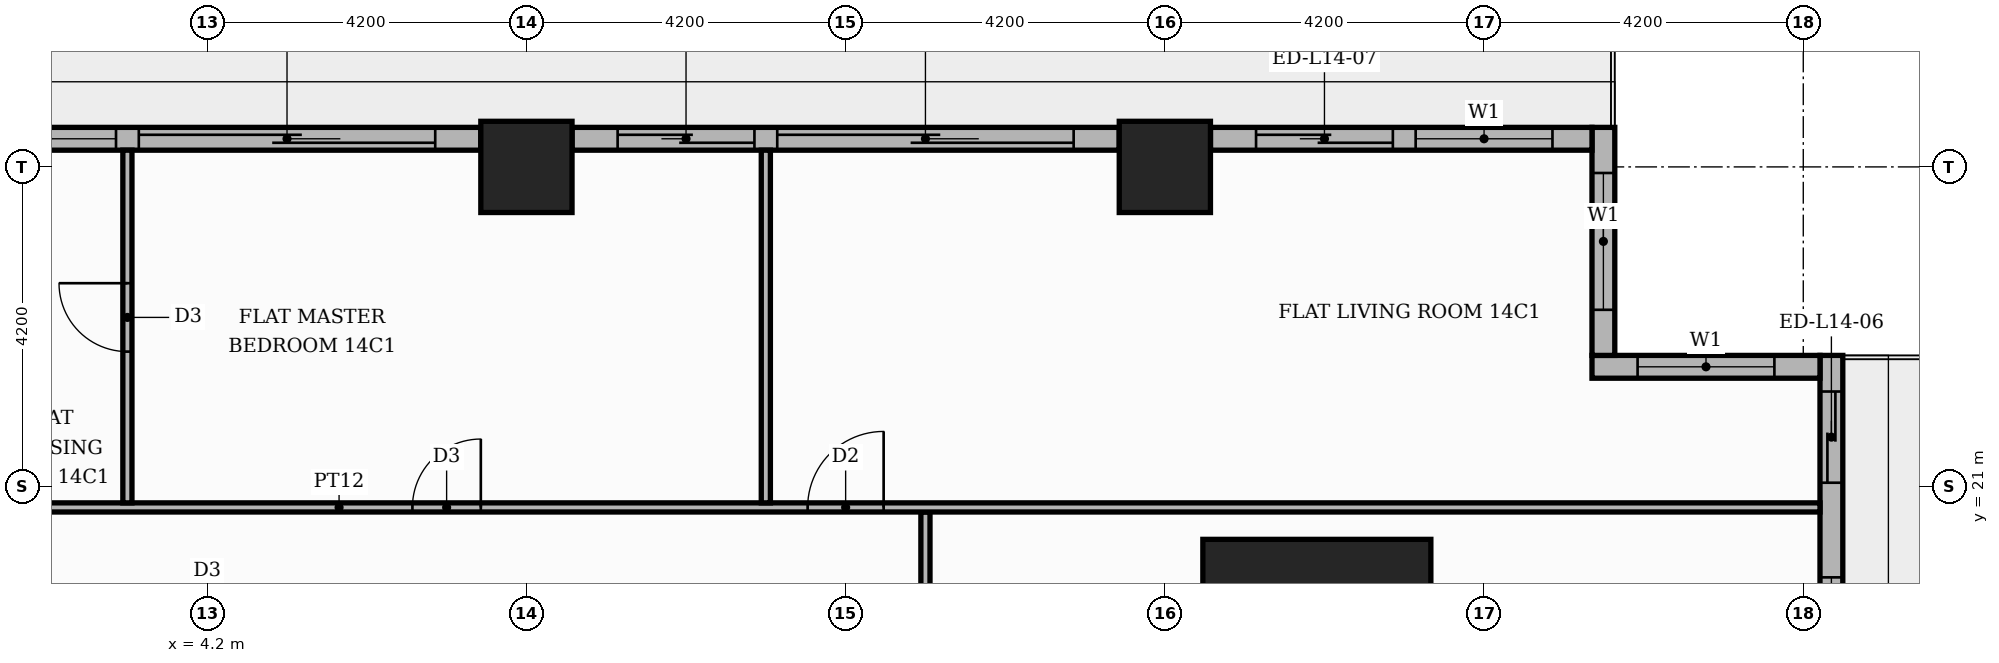
"""IFC4 building model, lengths in metres.
Left out: names, types, materials, properties, quantities, classifications, styles, units other than length and angle.
Written with IfcOpenShell. Run it as: python <this file> out.ifc"""

import sys

from ifc_helpers import new_model, si_unit, direction, frame, frame_2d, origin, origin_2d, place, context, subcontext, project, spatial, rectangle, extrude, element, fill, save


model = new_model("IFC4")
c1 = context("Model", 3, precision=1e-05, world=origin(), true_north=direction((0.0, 1.0)))
c2 = subcontext(c1, "Body", "Model", "MODEL_VIEW")
j1 = project(units=[si_unit("LENGTHUNIT", "METRE"), si_unit("PLANEANGLEUNIT", "RADIAN")], contexts=[c1])
p1 = place(None, origin())
s1 = spatial("IfcSite", under=j1, at=p1, CompositionType="ELEMENT")
p2 = place(p1, origin())
s2 = spatial("IfcBuilding", under=s1, at=p2, CompositionType="ELEMENT")
p3 = place(p2, frame((0.0, 0.0, 62.1)))
s3 = spatial("IfcBuildingStorey", under=s2, at=p3, CompositionType="ELEMENT", Elevation=62.1)
p4 = place(p3, frame((18.8, 18.8, 0.0), z_axis=(0.0, 0.0, 1.0), x_axis=(1.0, 0.0, 0.0)))
e1 = element("IfcColumn", 1, at=p4, inside=s3, PredefinedType="COLUMN", context=c2, shape_type="SweptSolid", body=[
    extrude(rectangle(XDim=3.0, YDim=3.0, at=origin_2d()), origin(), (0.0, 0.0, 1.0), 3.9),
])
for number, where, z_axis, x_axis in (
    (2, (8.4, 25.2, 0.0), (0.0, 0.0, 1.0), (1.0, 0.0, 0.0)),
    (3, (16.8, 25.2, 0.0), (0.0, 0.0, 1.0), (1.0, 0.0, 0.0)),
):
    element("IfcColumn", number, at=place(p3, frame(where, z_axis=z_axis, x_axis=x_axis)), inside=s3, PredefinedType="COLUMN", context=c2, shape_type="SweptSolid", body=[
        extrude(rectangle(XDim=1.2, YDim=1.2, at=origin_2d()), origin(), (0.0, 0.0, 1.0), 3.9),
    ])
p5 = place(p3, frame((25.57, 17.4, 0.0), z_axis=(0.0, 0.0, 1.0), x_axis=(0.0, 1.0, 0.0)))
e4 = element("IfcWall", 4, at=p5, inside=s3, PredefinedType="STANDARD", context=c2, shape_type="SweptSolid", body=[
    extrude(rectangle(XDim=5.32, YDim=0.3, at=frame_2d((2.66, 0.0))), origin(), (0.0, 0.0, 1.0), 3.48),
])
p6 = place(p5, frame((0.6, 0.0, 0.9)))
e5 = element("IfcOpeningElement", 5, at=p6, cuts=e4, PredefinedType="OPENING", context=c2, shape_type="SweptSolid", body=[
    extrude(rectangle(XDim=1.8, YDim=2.1, at=frame_2d((0.9, 1.05))), frame((0.0, 0.16, 0.0), z_axis=(0.0, -1.0, 0.0), x_axis=(1.0, 0.0, 0.0)), (0.0, 0.0, 1.0), 0.32),
])
p7 = place(p5, frame((3.645, 0.0, 0.0)))
e6 = element("IfcOpeningElement", 6, at=p7, cuts=e4, PredefinedType="OPENING", context=c2, shape_type="SweptSolid", body=[
    extrude(rectangle(XDim=1.2, YDim=2.4, at=frame_2d((0.6, 1.2))), frame((0.0, 0.16, 0.0), z_axis=(0.0, -1.0, 0.0), x_axis=(1.0, 0.0, 0.0)), (0.0, 0.0, 1.0), 0.32),
])
p8 = place(p3, frame((25.42, 22.57, 0.0), z_axis=(0.0, 0.0, 1.0), x_axis=(-1.0, 0.0, 0.0)))
e7 = element("IfcWall", 7, at=p8, inside=s3, PredefinedType="STANDARD", context=c2, shape_type="SweptSolid", body=[
    extrude(rectangle(XDim=3.0, YDim=0.3, at=frame_2d((1.5, 0.0))), origin(), (0.0, 0.0, 1.0), 3.48),
])
p9 = place(p8, frame((0.6, 0.0, 0.9)))
e8 = element("IfcOpeningElement", 8, at=p9, cuts=e7, PredefinedType="OPENING", context=c2, shape_type="SweptSolid", body=[
    extrude(rectangle(XDim=1.8, YDim=2.1, at=frame_2d((0.9, 1.05))), frame((0.0, 0.16, 0.0), z_axis=(0.0, -1.0, 0.0), x_axis=(1.0, 0.0, 0.0)), (0.0, 0.0, 1.0), 0.32),
])
p10 = place(p3, frame((22.57, 22.72, 0.0), z_axis=(0.0, 0.0, 1.0), x_axis=(0.0, 1.0, 0.0)))
e9 = element("IfcWall", 9, at=p10, inside=s3, PredefinedType="STANDARD", context=c2, shape_type="SweptSolid", body=[
    extrude(rectangle(XDim=3.0, YDim=0.3, at=frame_2d((1.5, 0.0))), origin(), (0.0, 0.0, 1.0), 3.48),
])
p11 = place(p10, frame((0.6, 0.0, 0.9)))
e10 = element("IfcOpeningElement", 10, at=p11, cuts=e9, PredefinedType="OPENING", context=c2, shape_type="SweptSolid", body=[
    extrude(rectangle(XDim=1.8, YDim=2.1, at=frame_2d((0.9, 1.05))), frame((0.0, 0.16, 0.0), z_axis=(0.0, -1.0, 0.0), x_axis=(1.0, 0.0, 0.0)), (0.0, 0.0, 1.0), 0.32),
])
p12 = place(p3, frame((22.42, 25.57, 0.0), z_axis=(0.0, 0.0, 1.0), x_axis=(-1.0, 0.0, 0.0)))
e11 = element("IfcWall", 11, at=p12, inside=s3, PredefinedType="STANDARD", context=c2, shape_type="SweptSolid", body=[
    extrude(rectangle(XDim=5.02, YDim=0.3, at=frame_2d((2.51, 0.0))), origin(), (0.0, 0.0, 1.0), 3.48),
])
p13 = place(p12, frame((0.52, 0.0, 0.9)))
e12 = element("IfcOpeningElement", 12, at=p13, cuts=e11, PredefinedType="OPENING", context=c2, shape_type="SweptSolid", body=[
    extrude(rectangle(XDim=1.8, YDim=2.1, at=frame_2d((0.9, 1.05))), frame((0.0, 0.16, 0.0), z_axis=(0.0, -1.0, 0.0), x_axis=(1.0, 0.0, 0.0)), (0.0, 0.0, 1.0), 0.32),
])
p14 = place(p12, frame((2.62, 0.0, 0.0)))
e13 = element("IfcOpeningElement", 13, at=p14, cuts=e11, PredefinedType="OPENING", context=c2, shape_type="SweptSolid", body=[
    extrude(rectangle(XDim=1.8, YDim=2.4, at=frame_2d((0.9, 1.2))), frame((0.0, 0.16, 0.0), z_axis=(0.0, -1.0, 0.0), x_axis=(1.0, 0.0, 0.0)), (0.0, 0.0, 1.0), 0.32),
])
p15 = place(p3, frame((16.2, 25.57, 0.0), z_axis=(0.0, 0.0, 1.0), x_axis=(-1.0, 0.0, 0.0)))
e14 = element("IfcWall", 14, at=p15, inside=s3, PredefinedType="STANDARD", context=c2, shape_type="SweptSolid", body=[
    extrude(rectangle(XDim=7.2, YDim=0.3, at=frame_2d((3.6, 0.0))), origin(), (0.0, 0.0, 1.0), 3.48),
])
p16 = place(p15, frame((0.6, 0.0, 0.0)))
e15 = element("IfcOpeningElement", 15, at=p16, cuts=e14, PredefinedType="OPENING", context=c2, shape_type="SweptSolid", body=[
    extrude(rectangle(XDim=3.9, YDim=2.4, at=frame_2d((1.95, 1.2))), frame((0.0, 0.16, 0.0), z_axis=(0.0, -1.0, 0.0), x_axis=(1.0, 0.0, 0.0)), (0.0, 0.0, 1.0), 0.32),
])
p17 = place(p15, frame((4.8, 0.0, 0.0)))
e16 = element("IfcOpeningElement", 16, at=p17, cuts=e14, PredefinedType="OPENING", context=c2, shape_type="SweptSolid", body=[
    extrude(rectangle(XDim=1.8, YDim=2.4, at=frame_2d((0.9, 1.2))), frame((0.0, 0.16, 0.0), z_axis=(0.0, -1.0, 0.0), x_axis=(1.0, 0.0, 0.0)), (0.0, 0.0, 1.0), 0.32),
])
p18 = place(p3, frame((7.8, 25.57, 0.0), z_axis=(0.0, 0.0, 1.0), x_axis=(-1.0, 0.0, 0.0)))
e17 = element("IfcWall", 17, at=p18, inside=s3, PredefinedType="STANDARD", context=c2, shape_type="SweptSolid", body=[
    extrude(rectangle(XDim=7.2, YDim=0.3, at=frame_2d((3.6, 0.0))), origin(), (0.0, 0.0, 1.0), 3.48),
])
p19 = place(p18, frame((0.6, 0.0, 0.0)))
e18 = element("IfcOpeningElement", 18, at=p19, cuts=e17, PredefinedType="OPENING", context=c2, shape_type="SweptSolid", body=[
    extrude(rectangle(XDim=3.9, YDim=2.4, at=frame_2d((1.95, 1.2))), frame((0.0, 0.16, 0.0), z_axis=(0.0, -1.0, 0.0), x_axis=(1.0, 0.0, 0.0)), (0.0, 0.0, 1.0), 0.32),
])
p20 = place(p18, frame((4.8, 0.0, 0.9)))
e19 = element("IfcOpeningElement", 19, at=p20, cuts=e17, PredefinedType="OPENING", context=c2, shape_type="SweptSolid", body=[
    extrude(rectangle(XDim=1.8, YDim=2.1, at=frame_2d((0.9, 1.05))), frame((0.0, 0.16, 0.0), z_axis=(0.0, -1.0, 0.0), x_axis=(1.0, 0.0, 0.0)), (0.0, 0.0, 1.0), 0.32),
])
p21 = place(p3, frame((13.65, 13.75, 0.0), z_axis=(0.0, 0.0, 1.0), x_axis=(0.0, 1.0, 0.0)))
e20 = element("IfcWall", 20, at=p21, inside=s3, PredefinedType="PARTITIONING", context=c2, shape_type="SweptSolid", body=[
    extrude(rectangle(XDim=6.91, YDim=0.12, at=frame_2d((3.455, 0.0))), origin(), (0.0, 0.0, 1.0), 3.48),
])
p22 = place(p21, frame((2.935, 0.0, 0.0)))
e21 = element("IfcOpeningElement", 21, at=p22, cuts=e20, PredefinedType="OPENING", context=c2, shape_type="SweptSolid", body=[
    extrude(rectangle(XDim=1.0, YDim=2.1, at=frame_2d((0.5, 1.05))), frame((0.0, 0.07, 0.0), z_axis=(0.0, -1.0, 0.0), x_axis=(1.0, 0.0, 0.0)), (0.0, 0.0, 1.0), 0.14),
])
p23 = place(p3, frame((-13.55, 20.72, 0.0), z_axis=(0.0, 0.0, 1.0), x_axis=(1.0, 0.0, 0.0)))
e22 = element("IfcWall", 22, at=p23, inside=s3, PredefinedType="PARTITIONING", context=c2, shape_type="SweptSolid", body=[
    extrude(rectangle(XDim=38.97, YDim=0.12, at=frame_2d((19.485, 0.0))), origin(), (0.0, 0.0, 1.0), 3.48),
])
p24 = place(p23, frame((25.65, 0.0, 0.0)))
e23 = element("IfcOpeningElement", 23, at=p24, cuts=e22, PredefinedType="OPENING", context=c2, shape_type="SweptSolid", body=[
    extrude(rectangle(XDim=1.0, YDim=2.1, at=frame_2d((0.5, 1.05))), frame((0.0, 0.07, 0.0), z_axis=(0.0, -1.0, 0.0), x_axis=(1.0, 0.0, 0.0)), (0.0, 0.0, 1.0), 0.14),
])
p25 = place(p23, frame((20.45, 0.0, 0.0)))
e24 = element("IfcOpeningElement", 24, at=p25, cuts=e22, PredefinedType="OPENING", context=c2, shape_type="SweptSolid", body=[
    extrude(rectangle(XDim=0.9, YDim=2.1, at=frame_2d((0.45, 1.05))), frame((0.0, 0.07, 0.0), z_axis=(0.0, -1.0, 0.0), x_axis=(1.0, 0.0, 0.0)), (0.0, 0.0, 1.0), 0.14),
])
p26 = place(p23, frame((9.95, 0.0, 0.0)))
e25 = element("IfcOpeningElement", 25, at=p26, cuts=e22, PredefinedType="OPENING", context=c2, shape_type="SweptSolid", body=[
    extrude(rectangle(XDim=0.9, YDim=2.1, at=frame_2d((0.45, 1.05))), frame((0.0, 0.07, 0.0), z_axis=(0.0, -1.0, 0.0), x_axis=(1.0, 0.0, 0.0)), (0.0, 0.0, 1.0), 0.14),
])
p27 = place(p23, frame((2.6, 0.0, 0.0)))
e26 = element("IfcOpeningElement", 26, at=p27, cuts=e22, PredefinedType="OPENING", context=c2, shape_type="SweptSolid", body=[
    extrude(rectangle(XDim=0.9, YDim=2.1, at=frame_2d((0.45, 1.05))), frame((0.0, 0.07, 0.0), z_axis=(0.0, -1.0, 0.0), x_axis=(1.0, 0.0, 0.0)), (0.0, 0.0, 1.0), 0.14),
])
p28 = place(p3, frame((3.15, 20.78, 0.0), z_axis=(0.0, 0.0, 1.0), x_axis=(0.0, 1.0, 0.0)))
e27 = element("IfcWall", 27, at=p28, inside=s3, PredefinedType="PARTITIONING", context=c2, shape_type="SweptSolid", body=[
    extrude(rectangle(XDim=4.64, YDim=0.12, at=frame_2d((2.32, 0.0))), origin(), (0.0, 0.0, 1.0), 3.48),
])
p29 = place(p28, frame((1.99, 0.0, 0.0)))
e28 = element("IfcOpeningElement", 28, at=p29, cuts=e27, PredefinedType="OPENING", context=c2, shape_type="SweptSolid", body=[
    extrude(rectangle(XDim=0.9, YDim=2.1, at=frame_2d((0.45, 1.05))), frame((0.0, 0.07, 0.0), z_axis=(0.0, -1.0, 0.0), x_axis=(1.0, 0.0, 0.0)), (0.0, 0.0, 1.0), 0.14),
])
p30 = place(p3, frame((11.55, 20.78, 0.0), z_axis=(0.0, 0.0, 1.0), x_axis=(0.0, 1.0, 0.0)))
e29 = element("IfcWall", 29, at=p30, inside=s3, PredefinedType="PARTITIONING", context=c2, shape_type="SweptSolid", body=[
    extrude(rectangle(XDim=4.64, YDim=0.12, at=frame_2d((2.32, 0.0))), origin(), (0.0, 0.0, 1.0), 3.48),
])
p31 = place(p6, origin())
e30 = element("IfcWindow", 30, at=p31, inside=s3, PartitioningType="SINGLE_PANEL", PredefinedType="WINDOW", context=c2, shape_type="SweptSolid", body=[
    extrude(rectangle(XDim=1.8, YDim=2.1, at=frame_2d((0.9, 1.05))), frame((0.0, 0.03, 0.0), z_axis=(0.0, -1.0, 0.0), x_axis=(1.0, 0.0, 0.0)), (0.0, 0.0, 1.0), 0.06),
])
fill(e5, e30)
p32 = place(p7, origin())
e31 = element("IfcDoor", 31, at=p32, inside=s3, OperationType="SLIDING_TO_RIGHT", PredefinedType="DOOR", context=c2, shape_type="SweptSolid", body=[
    extrude(rectangle(XDim=1.2, YDim=2.4, at=frame_2d((0.6, 1.2))), frame((0.0, 0.025, 0.0), z_axis=(0.0, -1.0, 0.0), x_axis=(1.0, 0.0, 0.0)), (0.0, 0.0, 1.0), 0.05),
])
fill(e6, e31)
p33 = place(p9, origin())
e32 = element("IfcWindow", 32, at=p33, inside=s3, PartitioningType="SINGLE_PANEL", PredefinedType="WINDOW", context=c2, shape_type="SweptSolid", body=[
    extrude(rectangle(XDim=1.8, YDim=2.1, at=frame_2d((0.9, 1.05))), frame((0.0, 0.03, 0.0), z_axis=(0.0, -1.0, 0.0), x_axis=(1.0, 0.0, 0.0)), (0.0, 0.0, 1.0), 0.06),
])
fill(e8, e32)
p34 = place(p11, origin())
e33 = element("IfcWindow", 33, at=p34, inside=s3, PartitioningType="SINGLE_PANEL", PredefinedType="WINDOW", context=c2, shape_type="SweptSolid", body=[
    extrude(rectangle(XDim=1.8, YDim=2.1, at=frame_2d((0.9, 1.05))), frame((0.0, 0.03, 0.0), z_axis=(0.0, -1.0, 0.0), x_axis=(1.0, 0.0, 0.0)), (0.0, 0.0, 1.0), 0.06),
])
fill(e10, e33)
p35 = place(p13, origin())
e34 = element("IfcWindow", 34, at=p35, inside=s3, PartitioningType="SINGLE_PANEL", PredefinedType="WINDOW", context=c2, shape_type="SweptSolid", body=[
    extrude(rectangle(XDim=1.8, YDim=2.1, at=frame_2d((0.9, 1.05))), frame((0.0, 0.03, 0.0), z_axis=(0.0, -1.0, 0.0), x_axis=(1.0, 0.0, 0.0)), (0.0, 0.0, 1.0), 0.06),
])
fill(e12, e34)
p36 = place(p14, origin())
e35 = element("IfcDoor", 35, at=p36, inside=s3, OperationType="SLIDING_TO_RIGHT", PredefinedType="DOOR", context=c2, shape_type="SweptSolid", body=[
    extrude(rectangle(XDim=1.8, YDim=2.4, at=frame_2d((0.9, 1.2))), frame((0.0, 0.025, 0.0), z_axis=(0.0, -1.0, 0.0), x_axis=(1.0, 0.0, 0.0)), (0.0, 0.0, 1.0), 0.05),
])
fill(e13, e35)
p37 = place(p16, origin())
e36 = element("IfcDoor", 36, at=p37, inside=s3, OperationType="SLIDING_TO_LEFT", PredefinedType="DOOR", context=c2, shape_type="SweptSolid", body=[
    extrude(rectangle(XDim=3.9, YDim=2.4, at=frame_2d((1.95, 1.2))), frame((0.0, 0.025, 0.0), z_axis=(0.0, -1.0, 0.0), x_axis=(1.0, 0.0, 0.0)), (0.0, 0.0, 1.0), 0.05),
])
fill(e15, e36)
p38 = place(p17, origin())
e37 = element("IfcDoor", 37, at=p38, inside=s3, OperationType="SLIDING_TO_RIGHT", PredefinedType="DOOR", context=c2, shape_type="SweptSolid", body=[
    extrude(rectangle(XDim=1.8, YDim=2.4, at=frame_2d((0.9, 1.2))), frame((0.0, 0.025, 0.0), z_axis=(0.0, -1.0, 0.0), x_axis=(1.0, 0.0, 0.0)), (0.0, 0.0, 1.0), 0.05),
])
fill(e16, e37)
p39 = place(p19, origin())
e38 = element("IfcDoor", 38, at=p39, inside=s3, OperationType="SLIDING_TO_LEFT", PredefinedType="DOOR", context=c2, shape_type="SweptSolid", body=[
    extrude(rectangle(XDim=3.9, YDim=2.4, at=frame_2d((1.95, 1.2))), frame((0.0, 0.025, 0.0), z_axis=(0.0, -1.0, 0.0), x_axis=(1.0, 0.0, 0.0)), (0.0, 0.0, 1.0), 0.05),
])
fill(e18, e38)
p40 = place(p20, origin())
e39 = element("IfcWindow", 39, at=p40, inside=s3, PartitioningType="SINGLE_PANEL", PredefinedType="WINDOW", context=c2, shape_type="SweptSolid", body=[
    extrude(rectangle(XDim=1.8, YDim=2.1, at=frame_2d((0.9, 1.05))), frame((0.0, 0.03, 0.0), z_axis=(0.0, -1.0, 0.0), x_axis=(1.0, 0.0, 0.0)), (0.0, 0.0, 1.0), 0.06),
])
fill(e19, e39)
p41 = place(p24, origin())
e40 = element("IfcDoor", 40, at=p41, inside=s3, OperationType="SINGLE_SWING_RIGHT", PredefinedType="DOOR", context=c2, shape_type="SweptSolid", body=[
    extrude(rectangle(XDim=1.0, YDim=2.1, at=frame_2d((0.5, 1.05))), frame((0.0, 0.025, 0.0), z_axis=(0.0, -1.0, 0.0), x_axis=(1.0, 0.0, 0.0)), (0.0, 0.0, 1.0), 0.05),
])
fill(e23, e40)
p42 = place(p25, origin())
e41 = element("IfcDoor", 41, at=p42, inside=s3, OperationType="SINGLE_SWING_RIGHT", PredefinedType="DOOR", context=c2, shape_type="SweptSolid", body=[
    extrude(rectangle(XDim=0.9, YDim=2.1, at=frame_2d((0.45, 1.05))), frame((0.0, 0.025, 0.0), z_axis=(0.0, -1.0, 0.0), x_axis=(1.0, 0.0, 0.0)), (0.0, 0.0, 1.0), 0.05),
])
fill(e24, e41)
p43 = place(p29, origin())
e42 = element("IfcDoor", 42, at=p43, inside=s3, OperationType="SINGLE_SWING_RIGHT", PredefinedType="DOOR", context=c2, shape_type="SweptSolid", body=[
    extrude(rectangle(XDim=0.9, YDim=2.1, at=frame_2d((0.45, 1.05))), frame((0.0, 0.025, 0.0), z_axis=(0.0, -1.0, 0.0), x_axis=(1.0, 0.0, 0.0)), (0.0, 0.0, 1.0), 0.05),
])
fill(e28, e42)
save(model, sys.argv[1])
